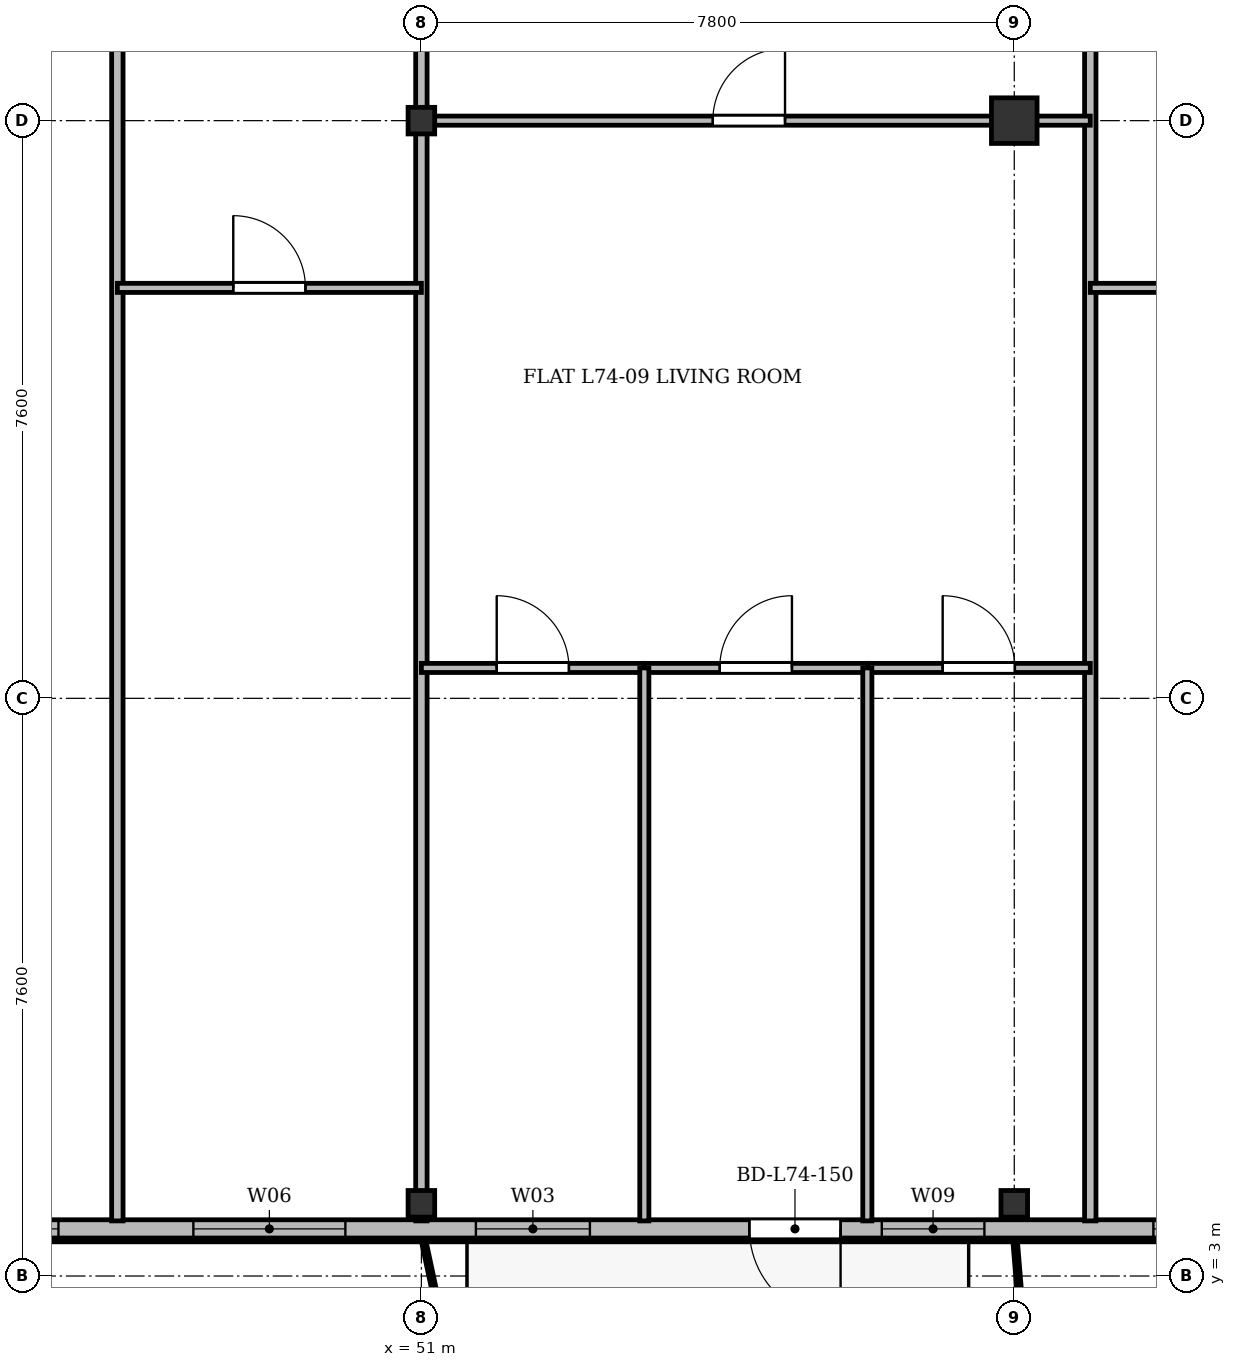
"""IFC4 building model, lengths in metres.
Left out: names, types, materials, properties, quantities, classifications, styles, units other than length and angle.
Written with IfcOpenShell. Run it as: python <this file> out.ifc"""

import sys

from ifc_helpers import new_model, si_unit, direction, frame, frame_2d, origin, origin_2d, place, context, subcontext, project, spatial, rectangle, i_section, extrude, source, transform, mapped, element, fill, save


model = new_model("IFC4")
c1 = context("Model", 3, precision=1e-05, world=origin(), true_north=direction((0.0, 1.0)))
c2 = subcontext(c1, "Body", "Model", "MODEL_VIEW")
j1 = project(units=[si_unit("LENGTHUNIT", "METRE"), si_unit("PLANEANGLEUNIT", "RADIAN")], contexts=[c1])
p1 = place(None, origin())
s1 = spatial("IfcSite", under=j1, at=p1, CompositionType="ELEMENT")
p2 = place(p1, origin())
s2 = spatial("IfcBuilding", under=s1, at=p2, CompositionType="ELEMENT")
p3 = place(p2, frame((0.0, 0.0, 284.7)))
s3 = spatial("IfcBuildingStorey", under=s2, at=p3, CompositionType="ELEMENT", Elevation=284.7)
m1 = source(origin(), c2, "Body", "SweptSolid", [
    extrude(i_section(OverallWidth=0.35, OverallDepth=0.35, WebThickness=0.018, FlangeThickness=0.028, at=origin_2d()), origin(), (0.0, 0.0, 1.0), 3.6),
])
for number, where, z_axis, x_axis in (
    (1, (51.0, 3.95, 0.0), (0.0, 0.0, 1.0), (1.0, 0.0, 0.0)),
    (2, (51.0, 18.2, 0.0), (0.0, 0.0, 1.0), (1.0, 0.0, 0.0)),
    (3, (58.8, 3.95, 0.0), (0.0, 0.0, 1.0), (1.0, 0.0, 0.0)),
):
    element("IfcColumn", number, at=place(p3, frame(where, z_axis=z_axis, x_axis=x_axis)), inside=s3, PredefinedType="COLUMN", context=c2, shape_type="MappedRepresentation", body=[
        mapped(m1, transform((0.0, 0.0, 0.0), x_axis=(1.0, 0.0, 0.0), y_axis=(0.0, 1.0, 0.0), z_axis=(0.0, 0.0, 1.0), scale=1.0)),
    ])
m2 = source(origin(), c2, "Body", "SweptSolid", [
    extrude(rectangle(XDim=0.6, YDim=0.6, at=origin_2d()), origin(), (0.0, 0.0, 1.0), 3.6),
])
p4 = place(p3, frame((58.8, 18.2, 0.0), z_axis=(0.0, 0.0, 1.0), x_axis=(1.0, 0.0, 0.0)))
e4 = element("IfcColumn", 4, at=p4, inside=s3, PredefinedType="COLUMN", context=c2, shape_type="MappedRepresentation", body=[
    mapped(m2, transform((0.0, 0.0, 0.0), x_axis=(1.0, 0.0, 0.0), y_axis=(0.0, 1.0, 0.0), z_axis=(0.0, 0.0, 1.0), scale=1.0)),
])
p5 = place(p3, frame((63.2, 3.62, 0.0), z_axis=(0.0, 0.0, 1.0), x_axis=(-1.0, 0.0, 0.0)))
e5 = element("IfcWall", 5, at=p5, inside=s3, PredefinedType="SOLIDWALL", context=c2, shape_type="SweptSolid", body=[
    extrude(rectangle(XDim=52.0, YDim=0.24, at=frame_2d((26.0, 0.0))), origin(), (0.0, 0.0, 1.0), 3.37),
])
p6 = place(p5, frame((0.92, 0.0, 0.9)))
e6 = element("IfcOpeningElement", 6, at=p6, cuts=e5, PredefinedType="OPENING", context=c2, shape_type="SweptSolid", body=[
    extrude(rectangle(XDim=1.65, YDim=1.85, at=frame_2d((0.825, 0.925))), frame((0.0, 0.13, 0.0), z_axis=(0.0, -1.0, 0.0), x_axis=(1.0, 0.0, 0.0)), (0.0, 0.0, 1.0), 0.26),
])
p7 = place(p5, frame((4.793, 0.0, 0.9)))
e7 = element("IfcOpeningElement", 7, at=p7, cuts=e5, PredefinedType="OPENING", context=c2, shape_type="SweptSolid", body=[
    extrude(rectangle(XDim=1.35, YDim=1.5, at=frame_2d((0.675, 0.75))), frame((0.0, 0.13, 0.0), z_axis=(0.0, -1.0, 0.0), x_axis=(1.0, 0.0, 0.0)), (0.0, 0.0, 1.0), 0.26),
])
p8 = place(p5, frame((6.685, 0.0, 0.0)))
e8 = element("IfcOpeningElement", 8, at=p8, cuts=e5, PredefinedType="OPENING", context=c2, shape_type="SweptSolid", body=[
    extrude(rectangle(XDim=1.2, YDim=2.2, at=frame_2d((0.6, 1.1))), frame((0.0, 0.13, 0.0), z_axis=(0.0, -1.0, 0.0), x_axis=(1.0, 0.0, 0.0)), (0.0, 0.0, 1.0), 0.26),
])
p9 = place(p5, frame((9.983, 0.0, 0.9)))
e9 = element("IfcOpeningElement", 9, at=p9, cuts=e5, PredefinedType="OPENING", context=c2, shape_type="SweptSolid", body=[
    extrude(rectangle(XDim=1.5, YDim=1.75, at=frame_2d((0.75, 0.875))), frame((0.0, 0.13, 0.0), z_axis=(0.0, -1.0, 0.0), x_axis=(1.0, 0.0, 0.0)), (0.0, 0.0, 1.0), 0.26),
])
p10 = place(p5, frame((13.2, 0.0, 0.9)))
e10 = element("IfcOpeningElement", 10, at=p10, cuts=e5, PredefinedType="OPENING", context=c2, shape_type="SweptSolid", body=[
    extrude(rectangle(XDim=2.0, YDim=1.95, at=frame_2d((1.0, 0.975))), frame((0.0, 0.13, 0.0), z_axis=(0.0, -1.0, 0.0), x_axis=(1.0, 0.0, 0.0)), (0.0, 0.0, 1.0), 0.26),
])
p11 = place(p5, frame((16.975, 0.0, 0.9)))
e11 = element("IfcOpeningElement", 11, at=p11, cuts=e5, PredefinedType="OPENING", context=c2, shape_type="SweptSolid", body=[
    extrude(rectangle(XDim=1.65, YDim=1.85, at=frame_2d((0.825, 0.925))), frame((0.0, 0.13, 0.0), z_axis=(0.0, -1.0, 0.0), x_axis=(1.0, 0.0, 0.0)), (0.0, 0.0, 1.0), 0.26),
])
p12 = place(p5, frame((21.3, 0.0, 0.9)))
e12 = element("IfcOpeningElement", 12, at=p12, cuts=e5, PredefinedType="OPENING", context=c2, shape_type="SweptSolid", body=[
    extrude(rectangle(XDim=1.8, YDim=1.8, at=frame_2d((0.9, 0.9))), frame((0.0, 0.13, 0.0), z_axis=(0.0, -1.0, 0.0), x_axis=(1.0, 0.0, 0.0)), (0.0, 0.0, 1.0), 0.26),
])
p13 = place(p5, frame((27.7, 0.0, 0.9)))
e13 = element("IfcOpeningElement", 13, at=p13, cuts=e5, PredefinedType="OPENING", context=c2, shape_type="SweptSolid", body=[
    extrude(rectangle(XDim=2.2, YDim=1.8, at=frame_2d((1.1, 0.9))), frame((0.0, 0.13, 0.0), z_axis=(0.0, -1.0, 0.0), x_axis=(1.0, 0.0, 0.0)), (0.0, 0.0, 1.0), 0.26),
])
p14 = place(p5, frame((33.873, 0.0, 0.0)))
e14 = element("IfcOpeningElement", 14, at=p14, cuts=e5, PredefinedType="OPENING", context=c2, shape_type="SweptSolid", body=[
    extrude(rectangle(XDim=1.2, YDim=2.2, at=frame_2d((0.6, 1.1))), frame((0.0, 0.13, 0.0), z_axis=(0.0, -1.0, 0.0), x_axis=(1.0, 0.0, 0.0)), (0.0, 0.0, 1.0), 0.26),
])
p15 = place(p5, frame((36.8, 0.0, 0.9)))
e15 = element("IfcOpeningElement", 15, at=p15, cuts=e5, PredefinedType="OPENING", context=c2, shape_type="SweptSolid", body=[
    extrude(rectangle(XDim=2.0, YDim=1.95, at=frame_2d((1.0, 0.975))), frame((0.0, 0.13, 0.0), z_axis=(0.0, -1.0, 0.0), x_axis=(1.0, 0.0, 0.0)), (0.0, 0.0, 1.0), 0.26),
])
p16 = place(p5, frame((40.475, 0.0, 0.9)))
e16 = element("IfcOpeningElement", 16, at=p16, cuts=e5, PredefinedType="OPENING", context=c2, shape_type="SweptSolid", body=[
    extrude(rectangle(XDim=1.65, YDim=1.85, at=frame_2d((0.825, 0.925))), frame((0.0, 0.13, 0.0), z_axis=(0.0, -1.0, 0.0), x_axis=(1.0, 0.0, 0.0)), (0.0, 0.0, 1.0), 0.26),
])
p17 = place(p5, frame((43.4, 0.0, 0.9)))
e17 = element("IfcOpeningElement", 17, at=p17, cuts=e5, PredefinedType="OPENING", context=c2, shape_type="SweptSolid", body=[
    extrude(rectangle(XDim=1.8, YDim=1.8, at=frame_2d((0.9, 0.9))), frame((0.0, 0.13, 0.0), z_axis=(0.0, -1.0, 0.0), x_axis=(1.0, 0.0, 0.0)), (0.0, 0.0, 1.0), 0.26),
])
p18 = place(p5, frame((45.99, 0.0, 0.9)))
e18 = element("IfcOpeningElement", 18, at=p18, cuts=e5, PredefinedType="OPENING", context=c2, shape_type="SweptSolid", body=[
    extrude(rectangle(XDim=1.2, YDim=1.65, at=frame_2d((0.6, 0.825))), frame((0.0, 0.13, 0.0), z_axis=(0.0, -1.0, 0.0), x_axis=(1.0, 0.0, 0.0)), (0.0, 0.0, 1.0), 0.26),
])
p19 = place(p5, frame((49.605, 0.0, 0.9)))
e19 = element("IfcOpeningElement", 19, at=p19, cuts=e5, PredefinedType="OPENING", context=c2, shape_type="SweptSolid", body=[
    extrude(rectangle(XDim=1.5, YDim=1.75, at=frame_2d((0.75, 0.875))), frame((0.0, 0.13, 0.0), z_axis=(0.0, -1.0, 0.0), x_axis=(1.0, 0.0, 0.0)), (0.0, 0.0, 1.0), 0.26),
])
p20 = place(p3, frame((47.0, 3.725, 0.0), z_axis=(0.0, 0.0, 1.0), x_axis=(0.0, 1.0, 0.0)))
e20 = element("IfcWall", 20, at=p20, inside=s3, PredefinedType="PARTITIONING", context=c2, shape_type="SweptSolid", body=[
    extrude(rectangle(XDim=27.275, YDim=0.15, at=frame_2d((13.637, 0.0))), origin(), (0.0, 0.0, 1.0), 2.92),
])
p21 = place(p3, frame((51.0, 3.725, 0.0), z_axis=(0.0, 0.0, 1.0), x_axis=(0.0, 1.0, 0.0)))
e21 = element("IfcWall", 21, at=p21, inside=s3, PredefinedType="PARTITIONING", context=c2, shape_type="SweptSolid", body=[
    extrude(rectangle(XDim=27.275, YDim=0.15, at=frame_2d((13.637, 0.0))), origin(), (0.0, 0.0, 1.0), 2.87),
])
p22 = place(p3, frame((59.8, 3.725, 0.0), z_axis=(0.0, 0.0, 1.0), x_axis=(0.0, 1.0, 0.0)))
e22 = element("IfcWall", 22, at=p22, inside=s3, PredefinedType="PARTITIONING", context=c2, shape_type="SweptSolid", body=[
    extrude(rectangle(XDim=27.275, YDim=0.15, at=frame_2d((13.637, 0.0))), origin(), (0.0, 0.0, 1.0), 2.92),
])
p23 = place(p3, frame((47.0, 16.0, 0.0), z_axis=(0.0, 0.0, 1.0), x_axis=(1.0, 0.0, 0.0)))
e23 = element("IfcWall", 23, at=p23, inside=s3, PredefinedType="PARTITIONING", context=c2, shape_type="SweptSolid", body=[
    extrude(rectangle(XDim=4.0, YDim=0.12, at=frame_2d((2.0, 0.0))), origin(), (0.0, 0.0, 1.0), 2.87),
])
p24 = place(p23, frame((1.525, 0.0, 0.0)))
e24 = element("IfcOpeningElement", 24, at=p24, cuts=e23, PredefinedType="OPENING", context=c2, shape_type="SweptSolid", body=[
    extrude(rectangle(XDim=0.95, YDim=2.15, at=frame_2d((0.475, 1.075))), frame((0.0, 0.07, 0.0), z_axis=(0.0, -1.0, 0.0), x_axis=(1.0, 0.0, 0.0)), (0.0, 0.0, 1.0), 0.14),
])
p25 = place(p3, frame((51.0, 18.2, 0.0), z_axis=(0.0, 0.0, 1.0), x_axis=(1.0, 0.0, 0.0)))
e25 = element("IfcWall", 25, at=p25, inside=s3, PredefinedType="PARTITIONING", context=c2, shape_type="SweptSolid", body=[
    extrude(rectangle(XDim=8.8, YDim=0.12, at=frame_2d((4.4, 0.0))), origin(), (0.0, 0.0, 1.0), 2.92),
])
p26 = place(p25, frame((3.834, 0.0, 0.0)))
e26 = element("IfcOpeningElement", 26, at=p26, cuts=e25, PredefinedType="OPENING", context=c2, shape_type="SweptSolid", body=[
    extrude(rectangle(XDim=0.95, YDim=2.15, at=frame_2d((0.475, 1.075))), frame((0.0, 0.07, 0.0), z_axis=(0.0, -1.0, 0.0), x_axis=(1.0, 0.0, 0.0)), (0.0, 0.0, 1.0), 0.14),
])
p27 = place(p3, frame((51.0, 11.0, 0.0), z_axis=(0.0, 0.0, 1.0), x_axis=(1.0, 0.0, 0.0)))
e27 = element("IfcWall", 27, at=p27, inside=s3, PredefinedType="PARTITIONING", context=c2, shape_type="SweptSolid", body=[
    extrude(rectangle(XDim=2.933, YDim=0.12, at=frame_2d((1.467, 0.0))), origin(), (0.0, 0.0, 1.0), 2.87),
])
p28 = place(p27, frame((0.991, 0.0, 0.0)))
e28 = element("IfcOpeningElement", 28, at=p28, cuts=e27, PredefinedType="OPENING", context=c2, shape_type="SweptSolid", body=[
    extrude(rectangle(XDim=0.95, YDim=2.15, at=frame_2d((0.475, 1.075))), frame((0.0, 0.07, 0.0), z_axis=(0.0, -1.0, 0.0), x_axis=(1.0, 0.0, 0.0)), (0.0, 0.0, 1.0), 0.14),
])
p29 = place(p3, frame((53.933, 11.0, 0.0), z_axis=(0.0, 0.0, 1.0), x_axis=(1.0, 0.0, 0.0)))
e29 = element("IfcWall", 29, at=p29, inside=s3, PredefinedType="PARTITIONING", context=c2, shape_type="SweptSolid", body=[
    extrude(rectangle(XDim=2.934, YDim=0.12, at=frame_2d((1.467, 0.0))), origin(), (0.0, 0.0, 1.0), 3.37),
])
p30 = place(p29, frame((0.992, 0.0, 0.0)))
e30 = element("IfcOpeningElement", 30, at=p30, cuts=e29, PredefinedType="OPENING", context=c2, shape_type="SweptSolid", body=[
    extrude(rectangle(XDim=0.95, YDim=2.15, at=frame_2d((0.475, 1.075))), frame((0.0, 0.07, 0.0), z_axis=(0.0, -1.0, 0.0), x_axis=(1.0, 0.0, 0.0)), (0.0, 0.0, 1.0), 0.14),
])
p31 = place(p3, frame((53.933, 3.725, 0.0), z_axis=(0.0, 0.0, 1.0), x_axis=(0.0, 1.0, 0.0)))
e31 = element("IfcWall", 31, at=p31, inside=s3, PredefinedType="PARTITIONING", context=c2, shape_type="SweptSolid", body=[
    extrude(rectangle(XDim=7.275, YDim=0.12, at=frame_2d((3.637, 0.0))), origin(), (0.0, 0.0, 1.0), 2.92),
])
p32 = place(p3, frame((56.867, 11.0, 0.0), z_axis=(0.0, 0.0, 1.0), x_axis=(1.0, 0.0, 0.0)))
e32 = element("IfcWall", 32, at=p32, inside=s3, PredefinedType="PARTITIONING", context=c2, shape_type="SweptSolid", body=[
    extrude(rectangle(XDim=2.933, YDim=0.12, at=frame_2d((1.467, 0.0))), origin(), (0.0, 0.0, 1.0), 2.87),
])
p33 = place(p32, frame((0.991, 0.0, 0.0)))
e33 = element("IfcOpeningElement", 33, at=p33, cuts=e32, PredefinedType="OPENING", context=c2, shape_type="SweptSolid", body=[
    extrude(rectangle(XDim=0.95, YDim=2.15, at=frame_2d((0.475, 1.075))), frame((0.0, 0.07, 0.0), z_axis=(0.0, -1.0, 0.0), x_axis=(1.0, 0.0, 0.0)), (0.0, 0.0, 1.0), 0.14),
])
p34 = place(p3, frame((56.867, 3.725, 0.0), z_axis=(0.0, 0.0, 1.0), x_axis=(0.0, 1.0, 0.0)))
e34 = element("IfcWall", 34, at=p34, inside=s3, PredefinedType="PARTITIONING", context=c2, shape_type="SweptSolid", body=[
    extrude(rectangle(XDim=7.275, YDim=0.12, at=frame_2d((3.637, 0.0))), origin(), (0.0, 0.0, 1.0), 2.92),
])
p35 = place(p3, frame((59.8, 16.0, 0.0), z_axis=(0.0, 0.0, 1.0), x_axis=(1.0, 0.0, 0.0)))
e35 = element("IfcWall", 35, at=p35, inside=s3, PredefinedType="PARTITIONING", context=c2, shape_type="SweptSolid", body=[
    extrude(rectangle(XDim=6.175, YDim=0.12, at=frame_2d((3.087, 0.0))), origin(), (0.0, 0.0, 1.0), 2.87),
])
p36 = place(p35, frame((2.612, 0.0, 0.0)))
e36 = element("IfcOpeningElement", 36, at=p36, cuts=e35, PredefinedType="OPENING", context=c2, shape_type="SweptSolid", body=[
    extrude(rectangle(XDim=0.95, YDim=2.15, at=frame_2d((0.475, 1.075))), frame((0.0, 0.07, 0.0), z_axis=(0.0, -1.0, 0.0), x_axis=(1.0, 0.0, 0.0)), (0.0, 0.0, 1.0), 0.14),
])
m3 = source(origin(), c2, "Body", "SweptSolid", [
    extrude(rectangle(XDim=1.65, YDim=1.85, at=frame_2d((0.825, 0.925))), frame((0.0, 0.03, 0.0), z_axis=(0.0, -1.0, 0.0), x_axis=(1.0, 0.0, 0.0)), (0.0, 0.0, 1.0), 0.06),
])
p37 = place(p6, origin())
e37 = element("IfcWindow", 37, at=p37, inside=s3, PartitioningType="SINGLE_PANEL", PredefinedType="WINDOW", context=c2, shape_type="MappedRepresentation", body=[
    mapped(m3, transform((0.0, 0.0, 0.0), x_axis=(1.0, 0.0, 0.0), y_axis=(0.0, 1.0, 0.0), z_axis=(0.0, 0.0, 1.0), scale=1.0)),
])
fill(e6, e37)
m4 = source(origin(), c2, "Body", "SweptSolid", [
    extrude(rectangle(XDim=1.35, YDim=1.5, at=frame_2d((0.675, 0.75))), frame((0.0, 0.03, 0.0), z_axis=(0.0, -1.0, 0.0), x_axis=(1.0, 0.0, 0.0)), (0.0, 0.0, 1.0), 0.06),
])
p38 = place(p7, origin())
e38 = element("IfcWindow", 38, at=p38, inside=s3, PartitioningType="SINGLE_PANEL", PredefinedType="WINDOW", context=c2, shape_type="MappedRepresentation", body=[
    mapped(m4, transform((0.0, 0.0, 0.0), x_axis=(1.0, 0.0, 0.0), y_axis=(0.0, 1.0, 0.0), z_axis=(0.0, 0.0, 1.0), scale=1.0)),
])
fill(e7, e38)
m5 = source(origin(), c2, "Body", "SweptSolid", [
    extrude(rectangle(XDim=1.2, YDim=2.2, at=frame_2d((0.6, 1.1))), frame((0.0, 0.025, 0.0), z_axis=(0.0, -1.0, 0.0), x_axis=(1.0, 0.0, 0.0)), (0.0, 0.0, 1.0), 0.05),
])
p39 = place(p8, origin())
e39 = element("IfcDoor", 39, at=p39, inside=s3, OperationType="SINGLE_SWING_LEFT", PredefinedType="DOOR", context=c2, shape_type="MappedRepresentation", body=[
    mapped(m5, transform((0.0, 0.0, 0.0), x_axis=(1.0, 0.0, 0.0), y_axis=(0.0, 1.0, 0.0), z_axis=(0.0, 0.0, 1.0), scale=1.0)),
])
fill(e8, e39)
m6 = source(origin(), c2, "Body", "SweptSolid", [
    extrude(rectangle(XDim=1.5, YDim=1.75, at=frame_2d((0.75, 0.875))), frame((0.0, 0.03, 0.0), z_axis=(0.0, -1.0, 0.0), x_axis=(1.0, 0.0, 0.0)), (0.0, 0.0, 1.0), 0.06),
])
p40 = place(p9, origin())
e40 = element("IfcWindow", 40, at=p40, inside=s3, PartitioningType="SINGLE_PANEL", PredefinedType="WINDOW", context=c2, shape_type="MappedRepresentation", body=[
    mapped(m6, transform((0.0, 0.0, 0.0), x_axis=(1.0, 0.0, 0.0), y_axis=(0.0, 1.0, 0.0), z_axis=(0.0, 0.0, 1.0), scale=1.0)),
])
fill(e9, e40)
m7 = source(origin(), c2, "Body", "SweptSolid", [
    extrude(rectangle(XDim=2.0, YDim=1.95, at=frame_2d((1.0, 0.975))), frame((0.0, 0.03, 0.0), z_axis=(0.0, -1.0, 0.0), x_axis=(1.0, 0.0, 0.0)), (0.0, 0.0, 1.0), 0.06),
])
p41 = place(p10, origin())
e41 = element("IfcWindow", 41, at=p41, inside=s3, PartitioningType="SINGLE_PANEL", PredefinedType="WINDOW", context=c2, shape_type="MappedRepresentation", body=[
    mapped(m7, transform((0.0, 0.0, 0.0), x_axis=(1.0, 0.0, 0.0), y_axis=(0.0, 1.0, 0.0), z_axis=(0.0, 0.0, 1.0), scale=1.0)),
])
fill(e10, e41)
p42 = place(p11, origin())
e42 = element("IfcWindow", 42, at=p42, inside=s3, PartitioningType="SINGLE_PANEL", PredefinedType="WINDOW", context=c2, shape_type="MappedRepresentation", body=[
    mapped(m3, transform((0.0, 0.0, 0.0), x_axis=(1.0, 0.0, 0.0), y_axis=(0.0, 1.0, 0.0), z_axis=(0.0, 0.0, 1.0), scale=1.0)),
])
fill(e11, e42)
m8 = source(origin(), c2, "Body", "SweptSolid", [
    extrude(rectangle(XDim=0.95, YDim=2.15, at=frame_2d((0.475, 1.075))), frame((0.0, 0.025, 0.0), z_axis=(0.0, -1.0, 0.0), x_axis=(1.0, 0.0, 0.0)), (0.0, 0.0, 1.0), 0.05),
])
p43 = place(p24, origin())
e43 = element("IfcDoor", 43, at=p43, inside=s3, OperationType="SINGLE_SWING_LEFT", PredefinedType="DOOR", context=c2, shape_type="MappedRepresentation", body=[
    mapped(m8, transform((0.0, 0.0, 0.0), x_axis=(1.0, 0.0, 0.0), y_axis=(0.0, 1.0, 0.0), z_axis=(0.0, 0.0, 1.0), scale=1.0)),
])
fill(e24, e43)
p44 = place(p26, origin())
e44 = element("IfcDoor", 44, at=p44, inside=s3, OperationType="SINGLE_SWING_RIGHT", PredefinedType="DOOR", context=c2, shape_type="MappedRepresentation", body=[
    mapped(m8, transform((0.0, 0.0, 0.0), x_axis=(1.0, 0.0, 0.0), y_axis=(0.0, 1.0, 0.0), z_axis=(0.0, 0.0, 1.0), scale=1.0)),
])
fill(e26, e44)
p45 = place(p28, origin())
e45 = element("IfcDoor", 45, at=p45, inside=s3, OperationType="SINGLE_SWING_LEFT", PredefinedType="DOOR", context=c2, shape_type="MappedRepresentation", body=[
    mapped(m8, transform((0.0, 0.0, 0.0), x_axis=(1.0, 0.0, 0.0), y_axis=(0.0, 1.0, 0.0), z_axis=(0.0, 0.0, 1.0), scale=1.0)),
])
fill(e28, e45)
p46 = place(p30, origin())
e46 = element("IfcDoor", 46, at=p46, inside=s3, OperationType="SINGLE_SWING_RIGHT", PredefinedType="DOOR", context=c2, shape_type="MappedRepresentation", body=[
    mapped(m8, transform((0.0, 0.0, 0.0), x_axis=(1.0, 0.0, 0.0), y_axis=(0.0, 1.0, 0.0), z_axis=(0.0, 0.0, 1.0), scale=1.0)),
])
fill(e30, e46)
p47 = place(p33, origin())
e47 = element("IfcDoor", 47, at=p47, inside=s3, OperationType="SINGLE_SWING_LEFT", PredefinedType="DOOR", context=c2, shape_type="MappedRepresentation", body=[
    mapped(m8, transform((0.0, 0.0, 0.0), x_axis=(1.0, 0.0, 0.0), y_axis=(0.0, 1.0, 0.0), z_axis=(0.0, 0.0, 1.0), scale=1.0)),
])
fill(e33, e47)
save(model, sys.argv[1])
